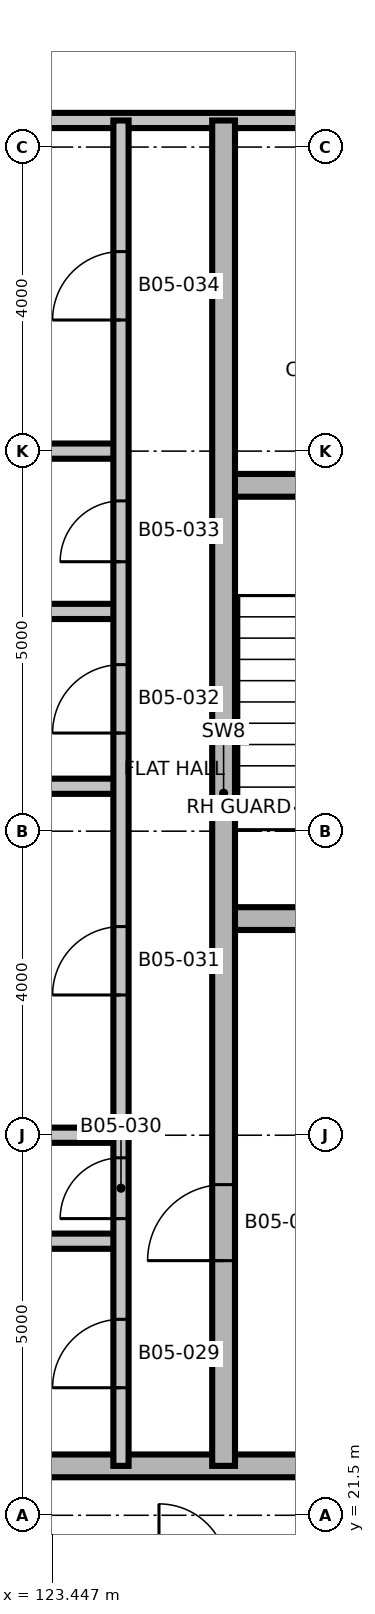
"""IFC4 building model, lengths in metres.
Left out: names, types, materials, properties, quantities, classifications, styles, units other than length and angle.
Written with IfcOpenShell. Run it as: python <this file> out.ifc"""

import sys

from ifc_helpers import new_model, si_unit, direction, frame, frame_2d, origin, place, context, subcontext, project, spatial, rectangle, extrude, element, fill, save


model = new_model("IFC4")
c1 = context("Model", 3, precision=1e-05, world=origin(), true_north=direction((0.0, 1.0)))
c2 = subcontext(c1, "Body", "Model", "MODEL_VIEW")
j1 = project(units=[si_unit("LENGTHUNIT", "METRE"), si_unit("PLANEANGLEUNIT", "RADIAN")], contexts=[c1])
p1 = place(None, origin())
s1 = spatial("IfcSite", under=j1, at=p1, CompositionType="ELEMENT")
p2 = place(p1, origin())
s2 = spatial("IfcBuilding", under=s1, at=p2, CompositionType="ELEMENT")
p3 = place(p2, frame((0.0, 0.0, 70.5)))
s3 = spatial("IfcBuildingStorey", under=s2, at=p3, CompositionType="ELEMENT", Elevation=70.5)
p4 = place(p3, frame((120.07, 22.15, 0.0), z_axis=(0.0, 0.0, 1.0), x_axis=(1.0, 0.0, 0.0)))
e1 = element("IfcWall", 1, at=p4, inside=s3, PredefinedType="SHEAR", context=c2, shape_type="SweptSolid", body=[
    extrude(rectangle(XDim=32.86, YDim=0.3, at=frame_2d((16.43, 0.0))), origin(), (0.0, 0.0, 1.0), 3.4),
])
p5 = place(p4, frame((22.68, 0.0, 0.0)))
e2 = element("IfcOpeningElement", 2, at=p5, cuts=e1, PredefinedType="OPENING", context=c2, shape_type="SweptSolid", body=[
    extrude(rectangle(XDim=1.0, YDim=2.1, at=frame_2d((0.5, 1.05))), frame((0.0, 0.16, 0.0), z_axis=(0.0, -1.0, 0.0), x_axis=(1.0, 0.0, 0.0)), (0.0, 0.0, 1.0), 0.32),
])
p6 = place(p4, frame((11.03, 0.0, 0.0)))
e3 = element("IfcOpeningElement", 3, at=p6, cuts=e1, PredefinedType="OPENING", context=c2, shape_type="SweptSolid", body=[
    extrude(rectangle(XDim=1.0, YDim=2.1, at=frame_2d((0.5, 1.05))), frame((0.0, 0.16, 0.0), z_axis=(0.0, -1.0, 0.0), x_axis=(1.0, 0.0, 0.0)), (0.0, 0.0, 1.0), 0.32),
])
p7 = place(p4, frame((24.58, 0.0, 0.0)))
e4 = element("IfcOpeningElement", 4, at=p7, cuts=e1, PredefinedType="OPENING", context=c2, shape_type="SweptSolid", body=[
    extrude(rectangle(XDim=1.0, YDim=2.1, at=frame_2d((0.5, 1.05))), frame((0.0, 0.16, 0.0), z_axis=(0.0, -1.0, 0.0), x_axis=(1.0, 0.0, 0.0)), (0.0, 0.0, 1.0), 0.32),
])
p8 = place(p4, frame((16.68, 0.0, 0.0)))
e5 = element("IfcOpeningElement", 5, at=p8, cuts=e1, PredefinedType="OPENING", context=c2, shape_type="SweptSolid", body=[
    extrude(rectangle(XDim=0.9, YDim=2.1, at=frame_2d((0.45, 1.05))), frame((0.0, 0.16, 0.0), z_axis=(0.0, -1.0, 0.0), x_axis=(1.0, 0.0, 0.0)), (0.0, 0.0, 1.0), 0.32),
])
for number, where, z_axis, x_axis in (
    (6, (120.07, 25.106, 0.0), (0.0, 0.0, 1.0), (1.0, 0.0, 0.0)),
    (7, (120.07, 26.5, 0.0), (0.0, 0.0, 1.0), (1.0, 0.0, 0.0)),
):
    element("IfcWall", number, at=place(p3, frame(where, z_axis=z_axis, x_axis=x_axis)), inside=s3, PredefinedType="PARTITIONING", context=c2, shape_type="SweptSolid", body=[
        extrude(rectangle(XDim=4.28, YDim=0.2, at=frame_2d((2.14, 0.0))), origin(), (0.0, 0.0, 1.0), 3.4),
    ])
p9 = place(p3, frame((125.7, 29.35, 0.0), z_axis=(0.0, 0.0, 1.0), x_axis=(1.0, 0.0, 0.0)))
e8 = element("IfcWall", 8, at=p9, inside=s3, PredefinedType="SHEAR", context=c2, shape_type="SweptSolid", body=[
    extrude(rectangle(XDim=2.83, YDim=0.3, at=frame_2d((1.415, 0.0))), origin(), (0.0, 0.0, 1.0), 3.4),
])
p10 = place(p9, frame((0.975, 0.0, 0.0)))
e9 = element("IfcOpeningElement", 9, at=p10, cuts=e8, PredefinedType="OPENING", context=c2, shape_type="SweptSolid", body=[
    extrude(rectangle(XDim=1.2, YDim=2.1, at=frame_2d((0.6, 1.05))), frame((0.0, 0.16, 0.0), z_axis=(0.0, -1.0, 0.0), x_axis=(1.0, 0.0, 0.0)), (0.0, 0.0, 1.0), 0.32),
])
for number, where, z_axis, x_axis in (
    (10, (120.07, 31.091, 0.0), (0.0, 0.0, 1.0), (1.0, 0.0, 0.0)),
    (11, (120.07, 33.391, 0.0), (0.0, 0.0, 1.0), (1.0, 0.0, 0.0)),
):
    element("IfcWall", number, at=place(p3, frame(where, z_axis=z_axis, x_axis=x_axis)), inside=s3, PredefinedType="PARTITIONING", context=c2, shape_type="SweptSolid", body=[
        extrude(rectangle(XDim=4.28, YDim=0.2, at=frame_2d((2.14, 0.0))), origin(), (0.0, 0.0, 1.0), 3.4),
    ])
p11 = place(p3, frame((125.7, 35.05, 0.0), z_axis=(0.0, 0.0, 1.0), x_axis=(1.0, 0.0, 0.0)))
e12 = element("IfcWall", 12, at=p11, inside=s3, PredefinedType="SHEAR", context=c2, shape_type="SweptSolid", body=[
    extrude(rectangle(XDim=2.83, YDim=0.3, at=frame_2d((1.415, 0.0))), origin(), (0.0, 0.0, 1.0), 3.4),
])
p12 = place(p3, frame((120.07, 35.5, 0.0), z_axis=(0.0, 0.0, 1.0), x_axis=(1.0, 0.0, 0.0)))
e13 = element("IfcWall", 13, at=p12, inside=s3, PredefinedType="PARTITIONING", context=c2, shape_type="SweptSolid", body=[
    extrude(rectangle(XDim=4.28, YDim=0.2, at=frame_2d((2.14, 0.0))), origin(), (0.0, 0.0, 1.0), 3.4),
])
p13 = place(p3, frame((120.07, 39.85, 0.0), z_axis=(0.0, 0.0, 1.0), x_axis=(1.0, 0.0, 0.0)))
e14 = element("IfcWall", 14, at=p13, inside=s3, PredefinedType="PARTITIONING", context=c2, shape_type="SweptSolid", body=[
    extrude(rectangle(XDim=32.86, YDim=0.2, at=frame_2d((16.43, 0.0))), origin(), (0.0, 0.0, 1.0), 3.4),
])
p14 = place(p13, frame((11.03, 0.0, 0.0)))
e15 = element("IfcOpeningElement", 15, at=p14, cuts=e14, PredefinedType="OPENING", context=c2, shape_type="SweptSolid", body=[
    extrude(rectangle(XDim=1.0, YDim=2.1, at=frame_2d((0.5, 1.05))), frame((0.0, 0.11, 0.0), z_axis=(0.0, -1.0, 0.0), x_axis=(1.0, 0.0, 0.0)), (0.0, 0.0, 1.0), 0.22),
])
p15 = place(p13, frame((20.83, 0.0, 0.0)))
e16 = element("IfcOpeningElement", 16, at=p15, cuts=e14, PredefinedType="OPENING", context=c2, shape_type="SweptSolid", body=[
    extrude(rectangle(XDim=1.0, YDim=2.1, at=frame_2d((0.5, 1.05))), frame((0.0, 0.11, 0.0), z_axis=(0.0, -1.0, 0.0), x_axis=(1.0, 0.0, 0.0)), (0.0, 0.0, 1.0), 0.22),
])
p16 = place(p3, frame((124.35, 22.15, 0.0), z_axis=(0.0, 0.0, 1.0), x_axis=(0.0, 1.0, 0.0)))
e17 = element("IfcWall", 17, at=p16, inside=s3, PredefinedType="PARTITIONING", context=c2, shape_type="SweptSolid", body=[
    extrude(rectangle(XDim=17.7, YDim=0.2, at=frame_2d((8.85, 0.0))), origin(), (0.0, 0.0, 1.0), 3.4),
])
p17 = place(p16, frame((1.028, 0.0, 0.0)))
e18 = element("IfcOpeningElement", 18, at=p17, cuts=e17, PredefinedType="OPENING", context=c2, shape_type="SweptSolid", body=[
    extrude(rectangle(XDim=0.9, YDim=2.1, at=frame_2d((0.45, 1.05))), frame((0.0, 0.11, 0.0), z_axis=(0.0, -1.0, 0.0), x_axis=(1.0, 0.0, 0.0)), (0.0, 0.0, 1.0), 0.22),
])
p18 = place(p16, frame((3.253, 0.0, 0.0)))
e19 = element("IfcOpeningElement", 19, at=p18, cuts=e17, PredefinedType="OPENING", context=c2, shape_type="SweptSolid", body=[
    extrude(rectangle(XDim=0.8, YDim=2.1, at=frame_2d((0.4, 1.05))), frame((0.0, 0.11, 0.0), z_axis=(0.0, -1.0, 0.0), x_axis=(1.0, 0.0, 0.0)), (0.0, 0.0, 1.0), 0.22),
])
p19 = place(p16, frame((6.195, 0.0, 0.0)))
e20 = element("IfcOpeningElement", 20, at=p19, cuts=e17, PredefinedType="OPENING", context=c2, shape_type="SweptSolid", body=[
    extrude(rectangle(XDim=0.9, YDim=2.1, at=frame_2d((0.45, 1.05))), frame((0.0, 0.11, 0.0), z_axis=(0.0, -1.0, 0.0), x_axis=(1.0, 0.0, 0.0)), (0.0, 0.0, 1.0), 0.22),
])
p20 = place(p16, frame((9.641, 0.0, 0.0)))
e21 = element("IfcOpeningElement", 21, at=p20, cuts=e17, PredefinedType="OPENING", context=c2, shape_type="SweptSolid", body=[
    extrude(rectangle(XDim=0.9, YDim=2.1, at=frame_2d((0.45, 1.05))), frame((0.0, 0.11, 0.0), z_axis=(0.0, -1.0, 0.0), x_axis=(1.0, 0.0, 0.0)), (0.0, 0.0, 1.0), 0.22),
])
p21 = place(p16, frame((11.895, 0.0, 0.0)))
e22 = element("IfcOpeningElement", 22, at=p21, cuts=e17, PredefinedType="OPENING", context=c2, shape_type="SweptSolid", body=[
    extrude(rectangle(XDim=0.8, YDim=2.1, at=frame_2d((0.4, 1.05))), frame((0.0, 0.11, 0.0), z_axis=(0.0, -1.0, 0.0), x_axis=(1.0, 0.0, 0.0)), (0.0, 0.0, 1.0), 0.22),
])
p22 = place(p16, frame((15.075, 0.0, 0.0)))
e23 = element("IfcOpeningElement", 23, at=p22, cuts=e17, PredefinedType="OPENING", context=c2, shape_type="SweptSolid", body=[
    extrude(rectangle(XDim=0.9, YDim=2.1, at=frame_2d((0.45, 1.05))), frame((0.0, 0.11, 0.0), z_axis=(0.0, -1.0, 0.0), x_axis=(1.0, 0.0, 0.0)), (0.0, 0.0, 1.0), 0.22),
])
p23 = place(p3, frame((125.7, 22.15, 0.0), z_axis=(0.0, 0.0, 1.0), x_axis=(0.0, 1.0, 0.0)))
e24 = element("IfcWall", 24, at=p23, inside=s3, PredefinedType="SHEAR", context=c2, shape_type="SweptSolid", body=[
    extrude(rectangle(XDim=17.7, YDim=0.3, at=frame_2d((8.85, 0.0))), origin(), (0.0, 0.0, 1.0), 3.4),
])
p24 = place(p23, frame((2.7, 0.0, 0.0)))
e25 = element("IfcOpeningElement", 25, at=p24, cuts=e24, PredefinedType="OPENING", context=c2, shape_type="SweptSolid", body=[
    extrude(rectangle(XDim=1.0, YDim=2.1, at=frame_2d((0.5, 1.05))), frame((0.0, 0.16, 0.0), z_axis=(0.0, -1.0, 0.0), x_axis=(1.0, 0.0, 0.0)), (0.0, 0.0, 1.0), 0.32),
])
p25 = place(p24, origin())
e26 = element("IfcDoor", 26, at=p25, inside=s3, OperationType="SINGLE_SWING_RIGHT", PredefinedType="DOOR", context=c2, shape_type="SweptSolid", body=[
    extrude(rectangle(XDim=1.0, YDim=2.1, at=frame_2d((0.5, 1.05))), frame((0.0, 0.025, 0.0), z_axis=(0.0, -1.0, 0.0), x_axis=(1.0, 0.0, 0.0)), (0.0, 0.0, 1.0), 0.05),
])
fill(e25, e26)
p26 = place(p17, origin())
e27 = element("IfcDoor", 27, at=p26, inside=s3, OperationType="SINGLE_SWING_LEFT", PredefinedType="DOOR", context=c2, shape_type="SweptSolid", body=[
    extrude(rectangle(XDim=0.9, YDim=2.1, at=frame_2d((0.45, 1.05))), frame((0.0, 0.025, 0.0), z_axis=(0.0, -1.0, 0.0), x_axis=(1.0, 0.0, 0.0)), (0.0, 0.0, 1.0), 0.05),
])
fill(e18, e27)
p27 = place(p18, origin())
e28 = element("IfcDoor", 28, at=p27, inside=s3, OperationType="SINGLE_SWING_RIGHT", PredefinedType="DOOR", context=c2, shape_type="SweptSolid", body=[
    extrude(rectangle(XDim=0.8, YDim=2.1, at=frame_2d((0.4, 1.05))), frame((0.0, 0.025, 0.0), z_axis=(0.0, -1.0, 0.0), x_axis=(1.0, 0.0, 0.0)), (0.0, 0.0, 1.0), 0.05),
])
fill(e19, e28)
p28 = place(p19, origin())
e29 = element("IfcDoor", 29, at=p28, inside=s3, OperationType="SINGLE_SWING_LEFT", PredefinedType="DOOR", context=c2, shape_type="SweptSolid", body=[
    extrude(rectangle(XDim=0.9, YDim=2.1, at=frame_2d((0.45, 1.05))), frame((0.0, 0.025, 0.0), z_axis=(0.0, -1.0, 0.0), x_axis=(1.0, 0.0, 0.0)), (0.0, 0.0, 1.0), 0.05),
])
fill(e20, e29)
p29 = place(p20, origin())
e30 = element("IfcDoor", 30, at=p29, inside=s3, OperationType="SINGLE_SWING_RIGHT", PredefinedType="DOOR", context=c2, shape_type="SweptSolid", body=[
    extrude(rectangle(XDim=0.9, YDim=2.1, at=frame_2d((0.45, 1.05))), frame((0.0, 0.025, 0.0), z_axis=(0.0, -1.0, 0.0), x_axis=(1.0, 0.0, 0.0)), (0.0, 0.0, 1.0), 0.05),
])
fill(e21, e30)
p30 = place(p21, origin())
e31 = element("IfcDoor", 31, at=p30, inside=s3, OperationType="SINGLE_SWING_LEFT", PredefinedType="DOOR", context=c2, shape_type="SweptSolid", body=[
    extrude(rectangle(XDim=0.8, YDim=2.1, at=frame_2d((0.4, 1.05))), frame((0.0, 0.025, 0.0), z_axis=(0.0, -1.0, 0.0), x_axis=(1.0, 0.0, 0.0)), (0.0, 0.0, 1.0), 0.05),
])
fill(e22, e31)
p31 = place(p22, origin())
e32 = element("IfcDoor", 32, at=p31, inside=s3, OperationType="SINGLE_SWING_RIGHT", PredefinedType="DOOR", context=c2, shape_type="SweptSolid", body=[
    extrude(rectangle(XDim=0.9, YDim=2.1, at=frame_2d((0.45, 1.05))), frame((0.0, 0.025, 0.0), z_axis=(0.0, -1.0, 0.0), x_axis=(1.0, 0.0, 0.0)), (0.0, 0.0, 1.0), 0.05),
])
fill(e23, e32)
save(model, sys.argv[1])
